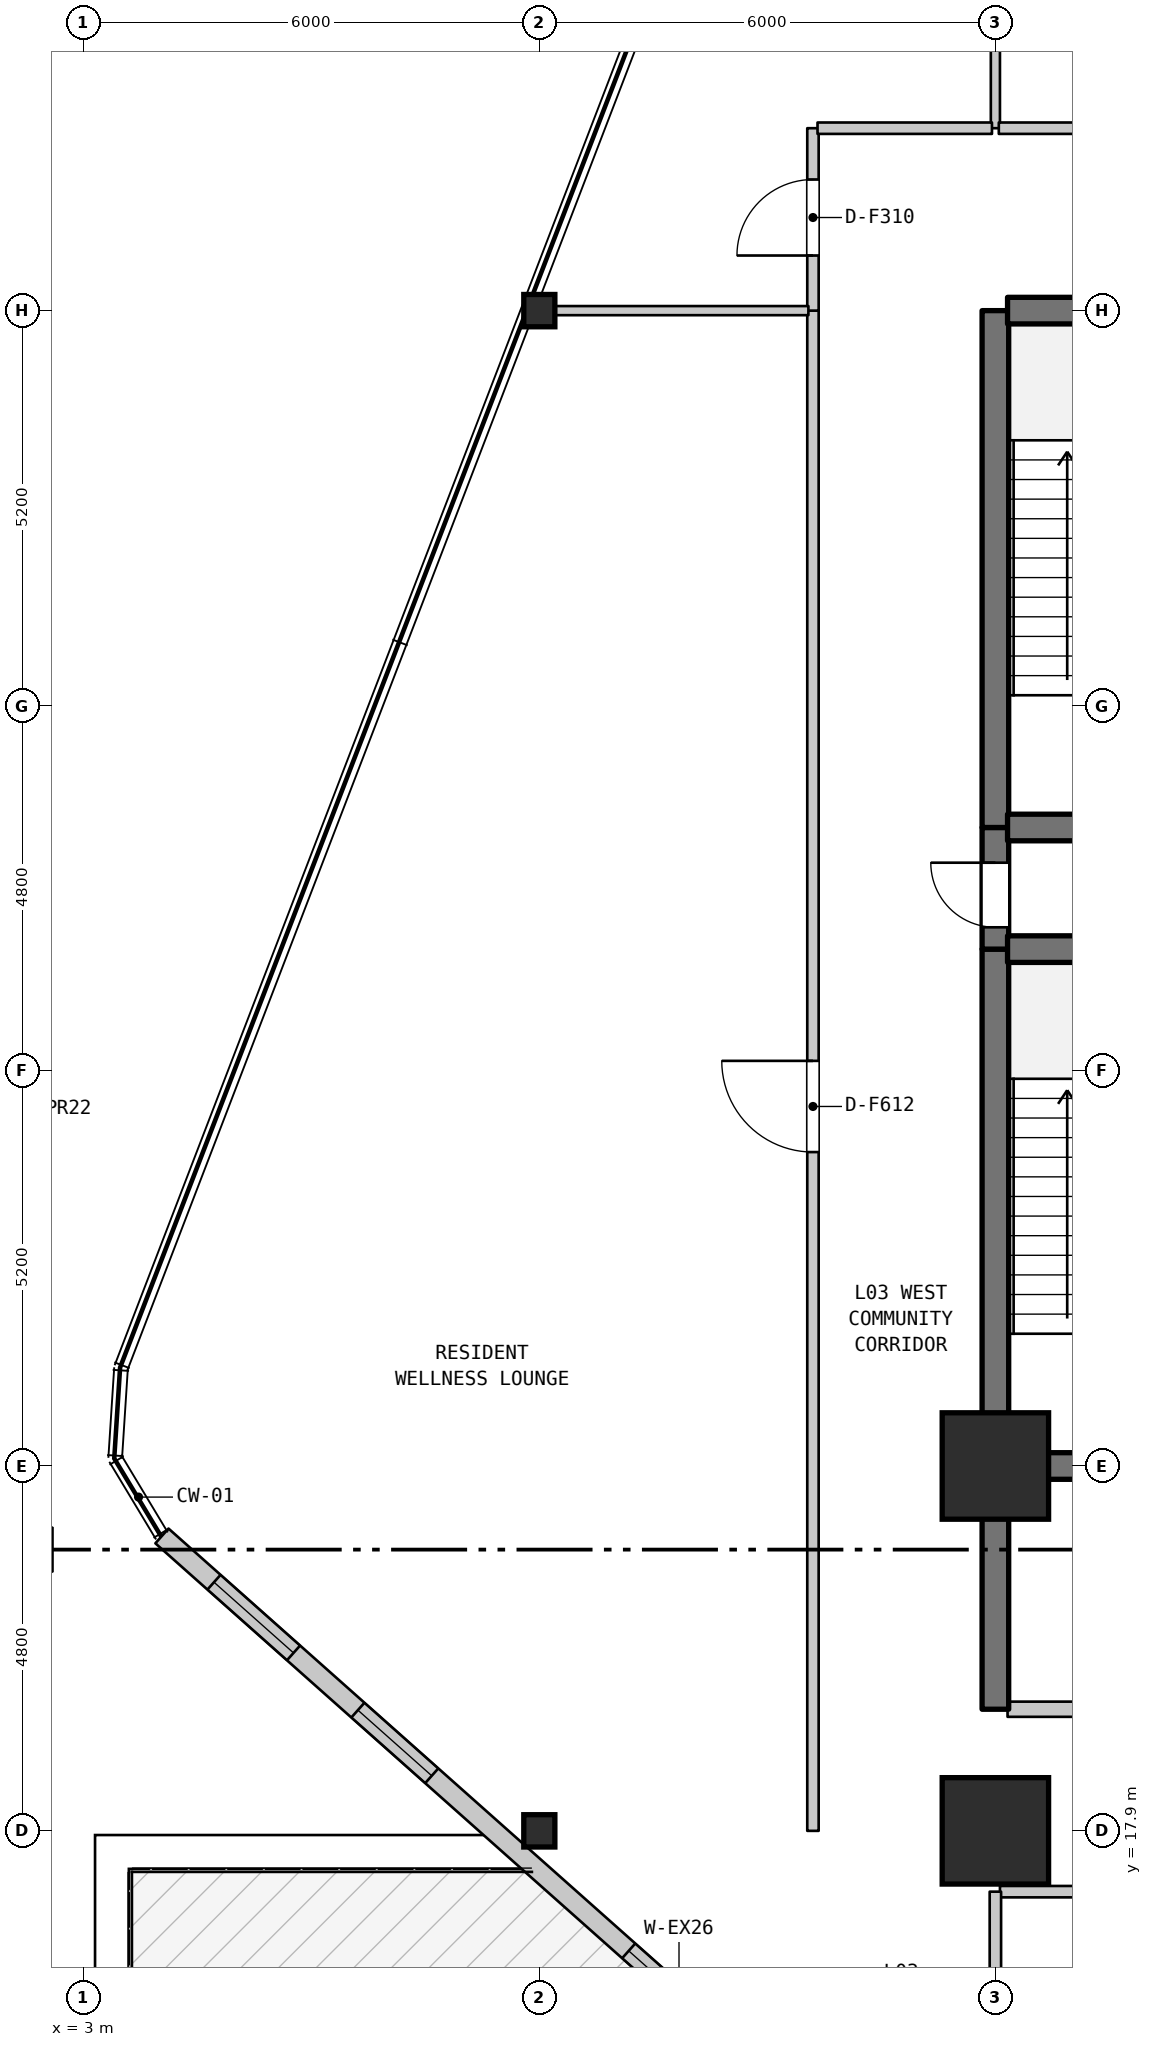
"""IFC4 building model, lengths in metres.
Left out: names, types, materials, properties, quantities, classifications, styles, units other than length and angle.
Written with IfcOpenShell. Run it as: python <this file> out.ifc"""

import sys

from ifc_helpers import new_model, si_unit, direction, frame, frame_2d, origin, origin_2d, place, context, subcontext, project, spatial, rectangle, i_section, extrude, element, fill, save


model = new_model("IFC4")
c1 = context("Model", 3, precision=1e-05, world=origin(), true_north=direction((0.0, 1.0)))
c2 = subcontext(c1, "Body", "Model", "MODEL_VIEW")
j1 = project(units=[si_unit("LENGTHUNIT", "METRE"), si_unit("PLANEANGLEUNIT", "RADIAN")], contexts=[c1])
p1 = place(None, origin())
s1 = spatial("IfcSite", under=j1, at=p1, CompositionType="ELEMENT")
p2 = place(p1, origin())
s2 = spatial("IfcBuilding", under=s1, at=p2, CompositionType="ELEMENT")
p3 = place(p2, frame((0.0, 0.0, 19.0)))
s3 = spatial("IfcBuildingStorey", under=s2, at=p3, CompositionType="ELEMENT", Elevation=19.0)
for number, where, z_axis, x_axis in (
    (1, (9.0, 17.9, 0.0), (0.0, 0.0, 1.0), (1.0, 0.0, 0.0)),
    (2, (9.0, 37.9, 0.0), (0.0, 0.0, 1.0), (1.0, 0.0, 0.0)),
):
    element("IfcColumn", number, at=place(p3, frame(where, z_axis=z_axis, x_axis=x_axis)), inside=s3, PredefinedType="COLUMN", context=c2, shape_type="SweptSolid", body=[
        extrude(i_section(OverallWidth=0.409, OverallDepth=0.425, WebThickness=0.032, FlangeThickness=0.052, FilletRadius=0.015, at=origin_2d()), origin(), (0.0, 0.0, 1.0), 5.0),
    ])
for number, where, z_axis, x_axis in (
    (3, (15.0, 17.9, 0.0), (0.0, 0.0, 1.0), (1.0, 0.0, 0.0)),
    (4, (15.0, 22.7, 0.0), (0.0, 0.0, 1.0), (1.0, 0.0, 0.0)),
):
    element("IfcColumn", number, at=place(p3, frame(where, z_axis=z_axis, x_axis=x_axis)), inside=s3, PredefinedType="COLUMN", context=c2, shape_type="SweptSolid", body=[
        extrude(rectangle(XDim=1.4, YDim=1.4, at=origin_2d()), origin(), (0.0, 0.0, 1.0), 5.0),
    ])
p4 = place(p3, frame((12.6, 17.9, 0.0), z_axis=(0.0, 0.0, 1.0), x_axis=(0.0, 1.0, 0.0)))
e5 = element("IfcWall", 5, at=p4, inside=s3, PredefinedType="STANDARD", context=c2, shape_type="SweptSolid", body=[
    extrude(rectangle(XDim=20.0, YDim=0.15, at=frame_2d((10.0, 0.0))), origin(), (0.0, 0.0, 1.0), 4.685),
])
p5 = place(p4, frame((8.93, 0.0, 0.0)))
e6 = element("IfcOpeningElement", 6, at=p5, cuts=e5, PredefinedType="OPENING", context=c2, shape_type="SweptSolid", body=[
    extrude(rectangle(XDim=1.2, YDim=2.2, at=frame_2d((0.6, 1.1))), frame((0.0, 0.085, 0.0), z_axis=(0.0, -1.0, 0.0), x_axis=(1.0, 0.0, 0.0)), (0.0, 0.0, 1.0), 0.17),
])
p6 = place(p3, frame((12.6, 37.9, 0.0), z_axis=(0.0, 0.0, 1.0), x_axis=(0.0, 1.0, 0.0)))
e7 = element("IfcWall", 7, at=p6, inside=s3, PredefinedType="STANDARD", context=c2, shape_type="SweptSolid", body=[
    extrude(rectangle(XDim=2.4, YDim=0.15, at=frame_2d((1.2, 0.0))), origin(), (0.0, 0.0, 1.0), 4.685),
])
p7 = place(p6, frame((0.725, 0.0, 0.0)))
e8 = element("IfcOpeningElement", 8, at=p7, cuts=e7, PredefinedType="OPENING", context=c2, shape_type="SweptSolid", body=[
    extrude(rectangle(XDim=1.0, YDim=2.15, at=frame_2d((0.5, 1.075))), frame((0.0, 0.085, 0.0), z_axis=(0.0, -1.0, 0.0), x_axis=(1.0, 0.0, 0.0)), (0.0, 0.0, 1.0), 0.17),
])
p8 = place(p3, frame((15.0, 19.5, 0.0), z_axis=(0.0, 0.0, 1.0), x_axis=(0.0, 1.0, 0.0)))
e9 = element("IfcWall", 9, at=p8, inside=s3, PredefinedType="SHEAR", context=c2, shape_type="SweptSolid", body=[
    extrude(rectangle(XDim=3.2, YDim=0.35, at=frame_2d((1.6, 0.0))), origin(), (0.0, 0.0, 1.0), 4.685),
])
p9 = place(p3, frame((15.0, 22.7, 0.0), z_axis=(0.0, 0.0, 1.0), x_axis=(0.0, 1.0, 0.0)))
e10 = element("IfcWall", 10, at=p9, inside=s3, PredefinedType="SHEAR", context=c2, shape_type="SweptSolid", body=[
    extrude(rectangle(XDim=6.8, YDim=0.35, at=frame_2d((3.4, 0.0))), origin(), (0.0, 0.0, 1.0), 4.685),
])
p10 = place(p3, frame((15.0, 29.5, 0.0), z_axis=(0.0, 0.0, 1.0), x_axis=(0.0, 1.0, 0.0)))
e11 = element("IfcWall", 11, at=p10, inside=s3, PredefinedType="SHEAR", context=c2, shape_type="SweptSolid", body=[
    extrude(rectangle(XDim=1.6, YDim=0.35, at=frame_2d((0.8, 0.0))), origin(), (0.0, 0.0, 1.0), 4.685),
])
p11 = place(p10, frame((0.287, 0.0, 0.0)))
e12 = element("IfcOpeningElement", 12, at=p11, cuts=e11, PredefinedType="OPENING", context=c2, shape_type="SweptSolid", body=[
    extrude(rectangle(XDim=0.85, YDim=2.1, at=frame_2d((0.425, 1.05))), frame((0.0, 0.185, 0.0), z_axis=(0.0, -1.0, 0.0), x_axis=(1.0, 0.0, 0.0)), (0.0, 0.0, 1.0), 0.37),
])
p12 = place(p3, frame((15.0, 31.1, 0.0), z_axis=(0.0, 0.0, 1.0), x_axis=(0.0, 1.0, 0.0)))
e13 = element("IfcWall", 13, at=p12, inside=s3, PredefinedType="SHEAR", context=c2, shape_type="SweptSolid", body=[
    extrude(rectangle(XDim=6.8, YDim=0.35, at=frame_2d((3.4, 0.0))), origin(), (0.0, 0.0, 1.0), 4.685),
])
p13 = place(p3, frame((15.0, 40.3, 0.0), z_axis=(0.0, 0.0, 1.0), x_axis=(0.0, 1.0, 0.0)))
e14 = element("IfcWall", 14, at=p13, inside=s3, PredefinedType="PARTITIONING", context=c2, shape_type="SweptSolid", body=[
    extrude(rectangle(XDim=12.933, YDim=0.12, at=frame_2d((6.466, 0.0))), origin(), (0.0, 0.0, 1.0), 4.685),
])
p14 = place(p3, frame((15.06, 17.1, 0.0), z_axis=(0.0, 0.0, 1.0), x_axis=(1.0, 0.0, 0.0)))
e15 = element("IfcWall", 15, at=p14, inside=s3, PredefinedType="STANDARD", context=c2, shape_type="SweptSolid", body=[
    extrude(rectangle(XDim=8.295, YDim=0.15, at=frame_2d((4.147, 0.0))), origin(), (0.0, 0.0, 1.0), 4.685),
])
p15 = place(p14, frame((1.595, 0.0, 0.0)))
e16 = element("IfcOpeningElement", 16, at=p15, cuts=e15, PredefinedType="OPENING", context=c2, shape_type="SweptSolid", body=[
    extrude(rectangle(XDim=0.9, YDim=2.1, at=frame_2d((0.45, 1.05))), frame((0.0, 0.085, 0.0), z_axis=(0.0, -1.0, 0.0), x_axis=(1.0, 0.0, 0.0)), (0.0, 0.0, 1.0), 0.17),
])
p16 = place(p14, frame((5.645, 0.0, 0.0)))
e17 = element("IfcOpeningElement", 17, at=p16, cuts=e15, PredefinedType="OPENING", context=c2, shape_type="SweptSolid", body=[
    extrude(rectangle(XDim=0.9, YDim=2.1, at=frame_2d((0.45, 1.05))), frame((0.0, 0.085, 0.0), z_axis=(0.0, -1.0, 0.0), x_axis=(1.0, 0.0, 0.0)), (0.0, 0.0, 1.0), 0.17),
])
p17 = place(p3, frame((15.16, 19.5, 0.0), z_axis=(0.0, 0.0, 1.0), x_axis=(1.0, 0.0, 0.0)))
e18 = element("IfcWall", 18, at=p17, inside=s3, PredefinedType="STANDARD", context=c2, shape_type="SweptSolid", body=[
    extrude(rectangle(XDim=3.68, YDim=0.2, at=frame_2d((1.84, 0.0))), origin(), (0.0, 0.0, 1.0), 4.685),
])
p18 = place(p17, frame((1.39, 0.0, 0.0)))
e19 = element("IfcOpeningElement", 19, at=p18, cuts=e18, PredefinedType="OPENING", context=c2, shape_type="SweptSolid", body=[
    extrude(rectangle(XDim=0.9, YDim=2.15, at=frame_2d((0.45, 1.075))), frame((0.0, 0.11, 0.0), z_axis=(0.0, -1.0, 0.0), x_axis=(1.0, 0.0, 0.0)), (0.0, 0.0, 1.0), 0.22),
])
for number, where, z_axis, x_axis in (
    (20, (15.16, 22.7, 0.0), (0.0, 0.0, 1.0), (1.0, 0.0, 0.0)),
    (21, (15.16, 29.5, 0.0), (0.0, 0.0, 1.0), (1.0, 0.0, 0.0)),
    (22, (15.16, 31.1, 0.0), (0.0, 0.0, 1.0), (1.0, 0.0, 0.0)),
):
    element("IfcWall", number, at=place(p3, frame(where, z_axis=z_axis, x_axis=x_axis)), inside=s3, PredefinedType="SHEAR", context=c2, shape_type="SweptSolid", body=[
        extrude(rectangle(XDim=3.68, YDim=0.35, at=frame_2d((1.84, 0.0))), origin(), (0.0, 0.0, 1.0), 4.685),
    ])
p19 = place(p3, frame((8.856, 37.9, 0.0), z_axis=(0.0, 0.0, 1.0), x_axis=(1.0, 0.0, 0.0)))
e23 = element("IfcWall", 23, at=p19, inside=s3, PredefinedType="PARTITIONING", context=c2, shape_type="SweptSolid", body=[
    extrude(rectangle(XDim=3.684, YDim=0.12, at=frame_2d((1.842, 0.0))), origin(), (0.0, 0.0, 1.0), 4.185),
])
p20 = place(p3, frame((15.16, 37.9, 0.0), z_axis=(0.0, 0.0, 1.0), x_axis=(1.0, 0.0, 0.0)))
e24 = element("IfcWall", 24, at=p20, inside=s3, PredefinedType="SHEAR", context=c2, shape_type="SweptSolid", body=[
    extrude(rectangle(XDim=3.68, YDim=0.35, at=frame_2d((1.84, 0.0))), origin(), (0.0, 0.0, 1.0), 4.685),
])
p21 = place(p3, frame((12.66, 40.3, 0.0), z_axis=(0.0, 0.0, 1.0), x_axis=(1.0, 0.0, 0.0)))
e25 = element("IfcWall", 25, at=p21, inside=s3, PredefinedType="STANDARD", context=c2, shape_type="SweptSolid", body=[
    extrude(rectangle(XDim=2.295, YDim=0.15, at=frame_2d((1.147, 0.0))), origin(), (0.0, 0.0, 1.0), 4.685),
])
p22 = place(p3, frame((15.045, 40.3, 0.0), z_axis=(0.0, 0.0, 1.0), x_axis=(1.0, 0.0, 0.0)))
e26 = element("IfcWall", 26, at=p22, inside=s3, PredefinedType="STANDARD", context=c2, shape_type="SweptSolid", body=[
    extrude(rectangle(XDim=17.895, YDim=0.15, at=frame_2d((8.948, 0.0))), origin(), (0.0, 0.0, 1.0), 4.685),
])
p23 = place(p22, frame((8.955, 0.0, 0.0)))
e27 = element("IfcOpeningElement", 27, at=p23, cuts=e26, PredefinedType="OPENING", context=c2, shape_type="SweptSolid", body=[
    extrude(rectangle(XDim=1.0, YDim=2.15, at=frame_2d((0.5, 1.075))), frame((0.0, 0.085, 0.0), z_axis=(0.0, -1.0, 0.0), x_axis=(1.0, 0.0, 0.0)), (0.0, 0.0, 1.0), 0.17),
])
p24 = place(p3, frame((17.64, 9.686, 0.0), z_axis=(0.0, 0.0, 1.0), x_axis=(-0.747409318684, 0.66436383883, 0.0)))
e28 = element("IfcWall", 28, at=p24, inside=s3, PredefinedType="STANDARD", context=c2, shape_type="SweptSolid", body=[
    extrude(rectangle(XDim=18.204, YDim=0.26, at=frame_2d((9.102, 0.0))), origin(), (0.0, 0.0, 1.0), 4.685),
])
p25 = place(p24, origin())
e29 = element("IfcOpeningElement", 29, at=p25, cuts=e28, PredefinedType="OPENING", context=c2, shape_type="SweptSolid", body=[
    extrude(rectangle(XDim=1.4, YDim=2.2, at=frame_2d((0.7, 1.1))), frame((0.0, 0.14, 0.0), z_axis=(0.0, -1.0, 0.0), x_axis=(1.0, 0.0, 0.0)), (0.0, 0.0, 1.0), 0.28),
])
p26 = place(p24, frame((6.154, 0.0, 0.9)))
e30 = element("IfcOpeningElement", 30, at=p26, cuts=e28, PredefinedType="OPENING", context=c2, shape_type="SweptSolid", body=[
    extrude(rectangle(XDim=1.3, YDim=1.9, at=frame_2d((0.65, 0.95))), frame((0.0, 0.14, 0.0), z_axis=(0.0, -1.0, 0.0), x_axis=(1.0, 0.0, 0.0)), (0.0, 0.0, 1.0), 0.28),
])
p27 = place(p24, frame((8.587, 0.0, 0.9)))
e31 = element("IfcOpeningElement", 31, at=p27, cuts=e28, PredefinedType="OPENING", context=c2, shape_type="SweptSolid", body=[
    extrude(rectangle(XDim=1.4, YDim=1.85, at=frame_2d((0.7, 0.925))), frame((0.0, 0.14, 0.0), z_axis=(0.0, -1.0, 0.0), x_axis=(1.0, 0.0, 0.0)), (0.0, 0.0, 1.0), 0.28),
])
p28 = place(p24, frame((13.454, 0.0, 0.9)))
e32 = element("IfcOpeningElement", 32, at=p28, cuts=e28, PredefinedType="OPENING", context=c2, shape_type="SweptSolid", body=[
    extrude(rectangle(XDim=1.3, YDim=1.9, at=frame_2d((0.65, 0.95))), frame((0.0, 0.14, 0.0), z_axis=(0.0, -1.0, 0.0), x_axis=(1.0, 0.0, 0.0)), (0.0, 0.0, 1.0), 0.28),
])
p29 = place(p24, frame((15.887, 0.0, 0.9)))
e33 = element("IfcOpeningElement", 33, at=p29, cuts=e28, PredefinedType="OPENING", context=c2, shape_type="SweptSolid", body=[
    extrude(rectangle(XDim=1.4, YDim=1.85, at=frame_2d((0.7, 0.925))), frame((0.0, 0.14, 0.0), z_axis=(0.0, -1.0, 0.0), x_axis=(1.0, 0.0, 0.0)), (0.0, 0.0, 1.0), 0.28),
])
p30 = place(p3, frame((15.0, 12.7, 0.0), z_axis=(0.0, 0.0, 1.0), x_axis=(0.0, 1.0, 0.0)))
e34 = element("IfcWall", 34, at=p30, inside=s3, PredefinedType="STANDARD", context=c2, shape_type="SweptSolid", body=[
    extrude(rectangle(XDim=4.4, YDim=0.15, at=frame_2d((2.2, 0.0))), origin(), (0.0, 0.0, 1.0), 4.185),
])
p31 = place(p27, origin())
e35 = element("IfcWindow", 35, at=p31, inside=s3, PartitioningType="SINGLE_PANEL", PredefinedType="WINDOW", context=c2, shape_type="SweptSolid", body=[
    extrude(rectangle(XDim=1.4, YDim=1.85, at=frame_2d((0.7, 0.925))), frame((0.0, 0.03, 0.0), z_axis=(0.0, -1.0, 0.0), x_axis=(1.0, 0.0, 0.0)), (0.0, 0.0, 1.0), 0.06),
])
fill(e31, e35)
p32 = place(p28, origin())
e36 = element("IfcWindow", 36, at=p32, inside=s3, PartitioningType="SINGLE_PANEL", PredefinedType="WINDOW", context=c2, shape_type="SweptSolid", body=[
    extrude(rectangle(XDim=1.3, YDim=1.9, at=frame_2d((0.65, 0.95))), frame((0.0, 0.03, 0.0), z_axis=(0.0, -1.0, 0.0), x_axis=(1.0, 0.0, 0.0)), (0.0, 0.0, 1.0), 0.06),
])
fill(e32, e36)
p33 = place(p29, origin())
e37 = element("IfcWindow", 37, at=p33, inside=s3, PartitioningType="SINGLE_PANEL", PredefinedType="WINDOW", context=c2, shape_type="SweptSolid", body=[
    extrude(rectangle(XDim=1.4, YDim=1.85, at=frame_2d((0.7, 0.925))), frame((0.0, 0.03, 0.0), z_axis=(0.0, -1.0, 0.0), x_axis=(1.0, 0.0, 0.0)), (0.0, 0.0, 1.0), 0.06),
])
fill(e33, e37)
p34 = place(p5, origin())
e38 = element("IfcDoor", 38, at=p34, inside=s3, OperationType="SINGLE_SWING_RIGHT", PredefinedType="DOOR", context=c2, shape_type="SweptSolid", body=[
    extrude(rectangle(XDim=1.2, YDim=2.2, at=frame_2d((0.6, 1.1))), frame((0.0, 0.025, 0.0), z_axis=(0.0, -1.0, 0.0), x_axis=(1.0, 0.0, 0.0)), (0.0, 0.0, 1.0), 0.05),
])
fill(e6, e38)
p35 = place(p7, origin())
e39 = element("IfcDoor", 39, at=p35, inside=s3, OperationType="SINGLE_SWING_LEFT", PredefinedType="DOOR", context=c2, shape_type="SweptSolid", body=[
    extrude(rectangle(XDim=1.0, YDim=2.15, at=frame_2d((0.5, 1.075))), frame((0.0, 0.025, 0.0), z_axis=(0.0, -1.0, 0.0), x_axis=(1.0, 0.0, 0.0)), (0.0, 0.0, 1.0), 0.05),
])
fill(e8, e39)
p36 = place(p11, origin())
e40 = element("IfcDoor", 40, at=p36, inside=s3, OperationType="SINGLE_SWING_RIGHT", PredefinedType="DOOR", context=c2, shape_type="SweptSolid", body=[
    extrude(rectangle(XDim=0.85, YDim=2.1, at=frame_2d((0.425, 1.05))), frame((0.0, 0.025, 0.0), z_axis=(0.0, -1.0, 0.0), x_axis=(1.0, 0.0, 0.0)), (0.0, 0.0, 1.0), 0.05),
])
fill(e12, e40)
save(model, sys.argv[1])
